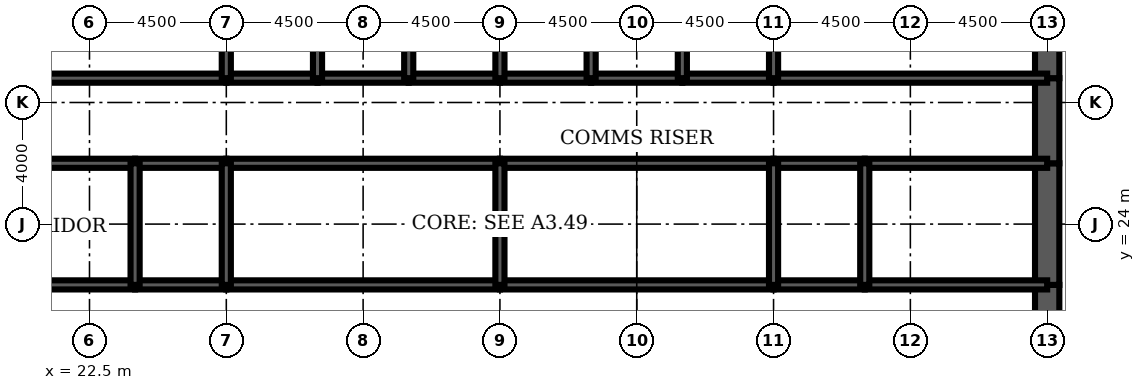
"""IFC4 building model, lengths in metres.
Left out: names, types, materials, properties, quantities, classifications, styles, units other than length and angle.
Written with IfcOpenShell. Run it as: python <this file> out.ifc"""

import sys

from ifc_helpers import new_model, si_unit, direction, frame, frame_2d, origin, place, context, subcontext, project, spatial, rectangle, extrude, element, fill, save


model = new_model("IFC4")
c1 = context("Model", 3, precision=1e-05, world=origin(), true_north=direction((0.0, 1.0)))
c2 = subcontext(c1, "Body", "Model", "MODEL_VIEW")
j1 = project(units=[si_unit("LENGTHUNIT", "METRE"), si_unit("PLANEANGLEUNIT", "RADIAN")], contexts=[c1])
p1 = place(None, origin())
s1 = spatial("IfcSite", under=j1, at=p1, CompositionType="ELEMENT")
p2 = place(p1, origin())
s2 = spatial("IfcBuilding", under=s1, at=p2, CompositionType="ELEMENT")
p3 = place(p2, frame((0.0, 0.0, 211.0)))
s3 = spatial("IfcBuildingStorey", under=s2, at=p3, CompositionType="ELEMENT", Elevation=211.0)
p4 = place(p3, frame((54.0, 19.2, 0.0), z_axis=(0.0, 0.0, 1.0), x_axis=(0.0, 1.0, 0.0)))
e1 = element("IfcWall", 1, at=p4, inside=s3, PredefinedType="SHEAR", context=c2, shape_type="SweptSolid", body=[
    extrude(rectangle(XDim=2.8, YDim=0.8, at=frame_2d((1.4, 0.0))), origin(), (0.0, 0.0, 1.0), 4.2),
])
p5 = place(p4, frame((0.4, 0.0, 0.0)))
e2 = element("IfcOpeningElement", 2, at=p5, cuts=e1, PredefinedType="OPENING", context=c2, shape_type="SweptSolid", body=[
    extrude(rectangle(XDim=1.8, YDim=2.1, at=frame_2d((0.9, 1.05))), frame((0.0, 0.41, 0.0), z_axis=(0.0, -1.0, 0.0), x_axis=(1.0, 0.0, 0.0)), (0.0, 0.0, 1.0), 0.82),
])
p6 = place(p3, frame((54.0, 22.0, 0.0), z_axis=(0.0, 0.0, 1.0), x_axis=(0.0, 1.0, 0.0)))
e3 = element("IfcWall", 3, at=p6, inside=s3, PredefinedType="SHEAR", context=c2, shape_type="SweptSolid", body=[
    extrude(rectangle(XDim=4.0, YDim=0.8, at=frame_2d((2.0, 0.0))), origin(), (0.0, 0.0, 1.0), 4.2),
])
p7 = place(p3, frame((54.0, 26.0, 0.0), z_axis=(0.0, 0.0, 1.0), x_axis=(0.0, 1.0, 0.0)))
e4 = element("IfcWall", 4, at=p7, inside=s3, PredefinedType="SHEAR", context=c2, shape_type="SweptSolid", body=[
    extrude(rectangle(XDim=2.8, YDim=0.8, at=frame_2d((1.4, 0.0))), origin(), (0.0, 0.0, 1.0), 4.2),
])
p8 = place(p7, frame((0.6, 0.0, 0.0)))
e5 = element("IfcOpeningElement", 5, at=p8, cuts=e4, PredefinedType="OPENING", context=c2, shape_type="SweptSolid", body=[
    extrude(rectangle(XDim=1.8, YDim=2.1, at=frame_2d((0.9, 1.05))), frame((0.0, 0.41, 0.0), z_axis=(0.0, -1.0, 0.0), x_axis=(1.0, 0.0, 0.0)), (0.0, 0.0, 1.0), 0.82),
])
p9 = place(p3, frame((54.0, 28.8, 0.0), z_axis=(0.0, 0.0, 1.0), x_axis=(0.0, 1.0, 0.0)))
e6 = element("IfcWall", 6, at=p9, inside=s3, PredefinedType="SHEAR", context=c2, shape_type="SweptSolid", body=[
    extrude(rectangle(XDim=3.2, YDim=0.8, at=frame_2d((1.6, 0.0))), origin(), (0.0, 0.0, 1.0), 4.2),
])
p10 = place(p3, frame((18.0, 28.8, 0.0), z_axis=(0.0, 0.0, 1.0), x_axis=(1.0, 0.0, 0.0)))
e7 = element("IfcWall", 7, at=p10, inside=s3, PredefinedType="SOLIDWALL", context=c2, shape_type="SweptSolid", body=[
    extrude(rectangle(XDim=9.0, YDim=0.3, at=frame_2d((4.5, 0.0))), origin(), (0.0, 0.0, 1.0), 4.2),
])
p11 = place(p10, frame((0.65, 0.0, 0.0)))
e8 = element("IfcOpeningElement", 8, at=p11, cuts=e7, PredefinedType="OPENING", context=c2, shape_type="SweptSolid", body=[
    extrude(rectangle(XDim=1.0, YDim=2.1, at=frame_2d((0.5, 1.05))), frame((0.0, 0.16, 0.0), z_axis=(0.0, -1.0, 0.0), x_axis=(1.0, 0.0, 0.0)), (0.0, 0.0, 1.0), 0.32),
])
p12 = place(p3, frame((27.0, 28.8, 0.0), z_axis=(0.0, 0.0, 1.0), x_axis=(1.0, 0.0, 0.0)))
e9 = element("IfcWall", 9, at=p12, inside=s3, PredefinedType="SOLIDWALL", context=c2, shape_type="SweptSolid", body=[
    extrude(rectangle(XDim=3.0, YDim=0.3, at=frame_2d((1.5, 0.0))), origin(), (0.0, 0.0, 1.0), 4.2),
])
p13 = place(p12, frame((0.95, 0.0, 0.0)))
e10 = element("IfcOpeningElement", 10, at=p13, cuts=e9, PredefinedType="OPENING", context=c2, shape_type="SweptSolid", body=[
    extrude(rectangle(XDim=1.1, YDim=2.2, at=frame_2d((0.55, 1.1))), frame((0.0, 0.16, 0.0), z_axis=(0.0, -1.0, 0.0), x_axis=(1.0, 0.0, 0.0)), (0.0, 0.0, 1.0), 0.32),
])
p14 = place(p3, frame((30.0, 28.8, 0.0), z_axis=(0.0, 0.0, 1.0), x_axis=(1.0, 0.0, 0.0)))
e11 = element("IfcWall", 11, at=p14, inside=s3, PredefinedType="SOLIDWALL", context=c2, shape_type="SweptSolid", body=[
    extrude(rectangle(XDim=3.0, YDim=0.3, at=frame_2d((1.5, 0.0))), origin(), (0.0, 0.0, 1.0), 4.2),
])
p15 = place(p14, frame((0.95, 0.0, 0.0)))
e12 = element("IfcOpeningElement", 12, at=p15, cuts=e11, PredefinedType="OPENING", context=c2, shape_type="SweptSolid", body=[
    extrude(rectangle(XDim=1.1, YDim=2.2, at=frame_2d((0.55, 1.1))), frame((0.0, 0.16, 0.0), z_axis=(0.0, -1.0, 0.0), x_axis=(1.0, 0.0, 0.0)), (0.0, 0.0, 1.0), 0.32),
])
p16 = place(p3, frame((33.0, 28.8, 0.0), z_axis=(0.0, 0.0, 1.0), x_axis=(1.0, 0.0, 0.0)))
e13 = element("IfcWall", 13, at=p16, inside=s3, PredefinedType="SOLIDWALL", context=c2, shape_type="SweptSolid", body=[
    extrude(rectangle(XDim=3.0, YDim=0.3, at=frame_2d((1.5, 0.0))), origin(), (0.0, 0.0, 1.0), 4.2),
])
p17 = place(p16, frame((0.95, 0.0, 0.0)))
e14 = element("IfcOpeningElement", 14, at=p17, cuts=e13, PredefinedType="OPENING", context=c2, shape_type="SweptSolid", body=[
    extrude(rectangle(XDim=1.1, YDim=2.2, at=frame_2d((0.55, 1.1))), frame((0.0, 0.16, 0.0), z_axis=(0.0, -1.0, 0.0), x_axis=(1.0, 0.0, 0.0)), (0.0, 0.0, 1.0), 0.32),
])
for number, where, z_axis, x_axis in (
    (15, (36.0, 28.8, 0.0), (0.0, 0.0, 1.0), (1.0, 0.0, 0.0)),
    (16, (39.0, 28.8, 0.0), (0.0, 0.0, 1.0), (1.0, 0.0, 0.0)),
):
    element("IfcWall", number, at=place(p3, frame(where, z_axis=z_axis, x_axis=x_axis)), inside=s3, PredefinedType="SOLIDWALL", context=c2, shape_type="SweptSolid", body=[
        extrude(rectangle(XDim=3.0, YDim=0.3, at=frame_2d((1.5, 0.0))), origin(), (0.0, 0.0, 1.0), 4.2),
    ])
p18 = place(p3, frame((42.0, 28.8, 0.0), z_axis=(0.0, 0.0, 1.0), x_axis=(1.0, 0.0, 0.0)))
e17 = element("IfcWall", 17, at=p18, inside=s3, PredefinedType="SOLIDWALL", context=c2, shape_type="SweptSolid", body=[
    extrude(rectangle(XDim=3.0, YDim=0.3, at=frame_2d((1.5, 0.0))), origin(), (0.0, 0.0, 1.0), 4.2),
])
p19 = place(p18, frame((0.95, 0.0, 0.0)))
e18 = element("IfcOpeningElement", 18, at=p19, cuts=e17, PredefinedType="OPENING", context=c2, shape_type="SweptSolid", body=[
    extrude(rectangle(XDim=1.1, YDim=2.2, at=frame_2d((0.55, 1.1))), frame((0.0, 0.16, 0.0), z_axis=(0.0, -1.0, 0.0), x_axis=(1.0, 0.0, 0.0)), (0.0, 0.0, 1.0), 0.32),
])
p20 = place(p3, frame((45.0, 28.8, 0.0), z_axis=(0.0, 0.0, 1.0), x_axis=(1.0, 0.0, 0.0)))
e19 = element("IfcWall", 19, at=p20, inside=s3, PredefinedType="SOLIDWALL", context=c2, shape_type="SweptSolid", body=[
    extrude(rectangle(XDim=9.0, YDim=0.3, at=frame_2d((4.5, 0.0))), origin(), (0.0, 0.0, 1.0), 4.2),
])
p21 = place(p20, frame((7.35, 0.0, 0.0)))
e20 = element("IfcOpeningElement", 20, at=p21, cuts=e19, PredefinedType="OPENING", context=c2, shape_type="SweptSolid", body=[
    extrude(rectangle(XDim=1.0, YDim=2.1, at=frame_2d((0.5, 1.05))), frame((0.0, 0.16, 0.0), z_axis=(0.0, -1.0, 0.0), x_axis=(1.0, 0.0, 0.0)), (0.0, 0.0, 1.0), 0.32),
])
p22 = place(p3, frame((18.0, 22.0, 0.0), z_axis=(0.0, 0.0, 1.0), x_axis=(1.0, 0.0, 0.0)))
e21 = element("IfcWall", 21, at=p22, inside=s3, PredefinedType="SOLIDWALL", context=c2, shape_type="SweptSolid", body=[
    extrude(rectangle(XDim=6.0, YDim=0.3, at=frame_2d((3.0, 0.0))), origin(), (0.0, 0.0, 1.0), 4.2),
])
p23 = place(p22, frame((2.0, 0.0, 0.0)))
e22 = element("IfcOpeningElement", 22, at=p23, cuts=e21, PredefinedType="OPENING", context=c2, shape_type="SweptSolid", body=[
    extrude(rectangle(XDim=1.0, YDim=2.1, at=frame_2d((0.5, 1.05))), frame((0.0, 0.16, 0.0), z_axis=(0.0, -1.0, 0.0), x_axis=(1.0, 0.0, 0.0)), (0.0, 0.0, 1.0), 0.32),
])
p24 = place(p3, frame((24.0, 22.0, 0.0), z_axis=(0.0, 0.0, 1.0), x_axis=(1.0, 0.0, 0.0)))
e23 = element("IfcWall", 23, at=p24, inside=s3, PredefinedType="SOLIDWALL", context=c2, shape_type="SweptSolid", body=[
    extrude(rectangle(XDim=3.0, YDim=0.3, at=frame_2d((1.5, 0.0))), origin(), (0.0, 0.0, 1.0), 4.2),
])
p25 = place(p24, frame((1.0, 0.0, 0.0)))
e24 = element("IfcOpeningElement", 24, at=p25, cuts=e23, PredefinedType="OPENING", context=c2, shape_type="SweptSolid", body=[
    extrude(rectangle(XDim=1.0, YDim=2.1, at=frame_2d((0.5, 1.05))), frame((0.0, 0.16, 0.0), z_axis=(0.0, -1.0, 0.0), x_axis=(1.0, 0.0, 0.0)), (0.0, 0.0, 1.0), 0.32),
])
p26 = place(p3, frame((27.0, 22.0, 0.0), z_axis=(0.0, 0.0, 1.0), x_axis=(1.0, 0.0, 0.0)))
e25 = element("IfcWall", 25, at=p26, inside=s3, PredefinedType="SOLIDWALL", context=c2, shape_type="SweptSolid", body=[
    extrude(rectangle(XDim=9.0, YDim=0.3, at=frame_2d((4.5, 0.0))), origin(), (0.0, 0.0, 1.0), 4.2),
])
p27 = place(p26, frame((4.0, 0.0, 0.0)))
e26 = element("IfcOpeningElement", 26, at=p27, cuts=e25, PredefinedType="OPENING", context=c2, shape_type="SweptSolid", body=[
    extrude(rectangle(XDim=1.0, YDim=2.1, at=frame_2d((0.5, 1.05))), frame((0.0, 0.16, 0.0), z_axis=(0.0, -1.0, 0.0), x_axis=(1.0, 0.0, 0.0)), (0.0, 0.0, 1.0), 0.32),
])
p28 = place(p3, frame((36.0, 22.0, 0.0), z_axis=(0.0, 0.0, 1.0), x_axis=(1.0, 0.0, 0.0)))
e27 = element("IfcWall", 27, at=p28, inside=s3, PredefinedType="SOLIDWALL", context=c2, shape_type="SweptSolid", body=[
    extrude(rectangle(XDim=9.0, YDim=0.3, at=frame_2d((4.5, 0.0))), origin(), (0.0, 0.0, 1.0), 4.2),
])
p29 = place(p28, frame((4.0, 0.0, 0.0)))
e28 = element("IfcOpeningElement", 28, at=p29, cuts=e27, PredefinedType="OPENING", context=c2, shape_type="SweptSolid", body=[
    extrude(rectangle(XDim=1.0, YDim=2.1, at=frame_2d((0.5, 1.05))), frame((0.0, 0.16, 0.0), z_axis=(0.0, -1.0, 0.0), x_axis=(1.0, 0.0, 0.0)), (0.0, 0.0, 1.0), 0.32),
])
p30 = place(p3, frame((45.0, 22.0, 0.0), z_axis=(0.0, 0.0, 1.0), x_axis=(1.0, 0.0, 0.0)))
e29 = element("IfcWall", 29, at=p30, inside=s3, PredefinedType="SOLIDWALL", context=c2, shape_type="SweptSolid", body=[
    extrude(rectangle(XDim=3.0, YDim=0.3, at=frame_2d((1.5, 0.0))), origin(), (0.0, 0.0, 1.0), 4.2),
])
p31 = place(p30, frame((1.0, 0.0, 0.0)))
e30 = element("IfcOpeningElement", 30, at=p31, cuts=e29, PredefinedType="OPENING", context=c2, shape_type="SweptSolid", body=[
    extrude(rectangle(XDim=1.0, YDim=2.1, at=frame_2d((0.5, 1.05))), frame((0.0, 0.16, 0.0), z_axis=(0.0, -1.0, 0.0), x_axis=(1.0, 0.0, 0.0)), (0.0, 0.0, 1.0), 0.32),
])
p32 = place(p3, frame((48.0, 22.0, 0.0), z_axis=(0.0, 0.0, 1.0), x_axis=(1.0, 0.0, 0.0)))
e31 = element("IfcWall", 31, at=p32, inside=s3, PredefinedType="SOLIDWALL", context=c2, shape_type="SweptSolid", body=[
    extrude(rectangle(XDim=6.0, YDim=0.3, at=frame_2d((3.0, 0.0))), origin(), (0.0, 0.0, 1.0), 4.2),
])
p33 = place(p32, frame((2.0, 0.0, 0.0)))
e32 = element("IfcOpeningElement", 32, at=p33, cuts=e31, PredefinedType="OPENING", context=c2, shape_type="SweptSolid", body=[
    extrude(rectangle(XDim=1.0, YDim=2.1, at=frame_2d((0.5, 1.05))), frame((0.0, 0.16, 0.0), z_axis=(0.0, -1.0, 0.0), x_axis=(1.0, 0.0, 0.0)), (0.0, 0.0, 1.0), 0.32),
])
p34 = place(p32, frame((4.2, 0.0, 0.0)))
e33 = element("IfcOpeningElement", 33, at=p34, cuts=e31, PredefinedType="OPENING", context=c2, shape_type="SweptSolid", body=[
    extrude(rectangle(XDim=1.0, YDim=2.1, at=frame_2d((0.5, 1.05))), frame((0.0, 0.16, 0.0), z_axis=(0.0, -1.0, 0.0), x_axis=(1.0, 0.0, 0.0)), (0.0, 0.0, 1.0), 0.32),
])
p35 = place(p3, frame((18.0, 26.0, 0.0), z_axis=(0.0, 0.0, 1.0), x_axis=(1.0, 0.0, 0.0)))
e34 = element("IfcWall", 34, at=p35, inside=s3, PredefinedType="SOLIDWALL", context=c2, shape_type="SweptSolid", body=[
    extrude(rectangle(XDim=6.0, YDim=0.3, at=frame_2d((3.0, 0.0))), origin(), (0.0, 0.0, 1.0), 4.2),
])
p36 = place(p3, frame((24.0, 26.0, 0.0), z_axis=(0.0, 0.0, 1.0), x_axis=(1.0, 0.0, 0.0)))
e35 = element("IfcWall", 35, at=p36, inside=s3, PredefinedType="SOLIDWALL", context=c2, shape_type="SweptSolid", body=[
    extrude(rectangle(XDim=3.0, YDim=0.3, at=frame_2d((1.5, 0.0))), origin(), (0.0, 0.0, 1.0), 4.2),
])
for number, where, z_axis, x_axis in (
    (36, (27.0, 26.0, 0.0), (0.0, 0.0, 1.0), (1.0, 0.0, 0.0)),
    (37, (36.0, 26.0, 0.0), (0.0, 0.0, 1.0), (1.0, 0.0, 0.0)),
):
    element("IfcWall", number, at=place(p3, frame(where, z_axis=z_axis, x_axis=x_axis)), inside=s3, PredefinedType="SOLIDWALL", context=c2, shape_type="SweptSolid", body=[
        extrude(rectangle(XDim=9.0, YDim=0.3, at=frame_2d((4.5, 0.0))), origin(), (0.0, 0.0, 1.0), 4.2),
    ])
p37 = place(p3, frame((45.0, 26.0, 0.0), z_axis=(0.0, 0.0, 1.0), x_axis=(1.0, 0.0, 0.0)))
e38 = element("IfcWall", 38, at=p37, inside=s3, PredefinedType="SOLIDWALL", context=c2, shape_type="SweptSolid", body=[
    extrude(rectangle(XDim=3.0, YDim=0.3, at=frame_2d((1.5, 0.0))), origin(), (0.0, 0.0, 1.0), 4.2),
])
p38 = place(p3, frame((48.0, 26.0, 0.0), z_axis=(0.0, 0.0, 1.0), x_axis=(1.0, 0.0, 0.0)))
e39 = element("IfcWall", 39, at=p38, inside=s3, PredefinedType="SOLIDWALL", context=c2, shape_type="SweptSolid", body=[
    extrude(rectangle(XDim=6.0, YDim=0.3, at=frame_2d((3.0, 0.0))), origin(), (0.0, 0.0, 1.0), 4.2),
])
for number, where, z_axis, x_axis in (
    (40, (27.0, 28.8, 0.0), (0.0, 0.0, 1.0), (0.0, 1.0, 0.0)),
    (41, (30.0, 28.8, 0.0), (0.0, 0.0, 1.0), (0.0, 1.0, 0.0)),
    (42, (33.0, 28.8, 0.0), (0.0, 0.0, 1.0), (0.0, 1.0, 0.0)),
    (43, (36.0, 28.8, 0.0), (0.0, 0.0, 1.0), (0.0, 1.0, 0.0)),
    (44, (39.0, 28.8, 0.0), (0.0, 0.0, 1.0), (0.0, 1.0, 0.0)),
    (45, (42.0, 28.8, 0.0), (0.0, 0.0, 1.0), (0.0, 1.0, 0.0)),
    (46, (45.0, 28.8, 0.0), (0.0, 0.0, 1.0), (0.0, 1.0, 0.0)),
):
    element("IfcWall", number, at=place(p3, frame(where, z_axis=z_axis, x_axis=x_axis)), inside=s3, PredefinedType="SOLIDWALL", context=c2, shape_type="SweptSolid", body=[
        extrude(rectangle(XDim=3.2, YDim=0.3, at=frame_2d((1.6, 0.0))), origin(), (0.0, 0.0, 1.0), 4.2),
    ])
for number, where, z_axis, x_axis in (
    (47, (24.0, 22.0, 0.0), (0.0, 0.0, 1.0), (0.0, 1.0, 0.0)),
    (48, (27.0, 22.0, 0.0), (0.0, 0.0, 1.0), (0.0, 1.0, 0.0)),
    (49, (36.0, 22.0, 0.0), (0.0, 0.0, 1.0), (0.0, 1.0, 0.0)),
    (50, (45.0, 22.0, 0.0), (0.0, 0.0, 1.0), (0.0, 1.0, 0.0)),
    (51, (48.0, 22.0, 0.0), (0.0, 0.0, 1.0), (0.0, 1.0, 0.0)),
):
    element("IfcWall", number, at=place(p3, frame(where, z_axis=z_axis, x_axis=x_axis)), inside=s3, PredefinedType="SOLIDWALL", context=c2, shape_type="SweptSolid", body=[
        extrude(rectangle(XDim=4.0, YDim=0.3, at=frame_2d((2.0, 0.0))), origin(), (0.0, 0.0, 1.0), 4.2),
    ])
p39 = place(p3, frame((51.725, 22.15, 0.0), z_axis=(0.0, 0.0, 1.0), x_axis=(0.0, 1.0, 0.0)))
e52 = element("IfcWall", 52, at=p39, inside=s3, PredefinedType="PARTITIONING", context=c2, shape_type="SweptSolid", body=[
    extrude(rectangle(XDim=3.7, YDim=0.15, at=frame_2d((1.85, 0.0))), origin(), (0.0, 0.0, 1.0), 3.0),
])
p40 = place(p3, frame((22.2, 26.15, 0.0), z_axis=(0.0, 0.0, 1.0), x_axis=(0.0, 1.0, 0.0)))
e53 = element("IfcWall", 53, at=p40, inside=s3, PredefinedType="PARTITIONING", context=c2, shape_type="SweptSolid", body=[
    extrude(rectangle(XDim=2.5, YDim=0.15, at=frame_2d((1.25, 0.0))), origin(), (0.0, 0.0, 1.0), 3.0),
])
p41 = place(p40, frame((0.35, 0.0, 0.0)))
e54 = element("IfcOpeningElement", 54, at=p41, cuts=e53, PredefinedType="OPENING", context=c2, shape_type="SweptSolid", body=[
    extrude(rectangle(XDim=1.0, YDim=2.1, at=frame_2d((0.5, 1.05))), frame((0.0, 0.085, 0.0), z_axis=(0.0, -1.0, 0.0), x_axis=(1.0, 0.0, 0.0)), (0.0, 0.0, 1.0), 0.17),
])
p42 = place(p41, origin())
e55 = element("IfcDoor", 55, at=p42, inside=s3, OperationType="SINGLE_SWING_LEFT", PredefinedType="DOOR", context=c2, shape_type="SweptSolid", body=[
    extrude(rectangle(XDim=1.0, YDim=2.1, at=frame_2d((0.5, 1.05))), frame((0.0, 0.025, 0.0), z_axis=(0.0, -1.0, 0.0), x_axis=(1.0, 0.0, 0.0)), (0.0, 0.0, 1.0), 0.05),
])
fill(e54, e55)
p43 = place(p19, origin())
e56 = element("IfcDoor", 56, at=p43, inside=s3, OperationType="DOUBLE_DOOR_SLIDING", PredefinedType="USERDEFINED", context=c2, shape_type="SweptSolid", body=[
    extrude(rectangle(XDim=1.1, YDim=2.2, at=frame_2d((0.55, 1.1))), frame((0.0, 0.025, 0.0), z_axis=(0.0, -1.0, 0.0), x_axis=(1.0, 0.0, 0.0)), (0.0, 0.0, 1.0), 0.05),
])
fill(e18, e56)
p44 = place(p13, origin())
e57 = element("IfcDoor", 57, at=p44, inside=s3, OperationType="DOUBLE_DOOR_SLIDING", PredefinedType="USERDEFINED", context=c2, shape_type="SweptSolid", body=[
    extrude(rectangle(XDim=1.1, YDim=2.2, at=frame_2d((0.55, 1.1))), frame((0.0, 0.025, 0.0), z_axis=(0.0, -1.0, 0.0), x_axis=(1.0, 0.0, 0.0)), (0.0, 0.0, 1.0), 0.05),
])
fill(e10, e57)
p45 = place(p15, origin())
e58 = element("IfcDoor", 58, at=p45, inside=s3, OperationType="DOUBLE_DOOR_SLIDING", PredefinedType="USERDEFINED", context=c2, shape_type="SweptSolid", body=[
    extrude(rectangle(XDim=1.1, YDim=2.2, at=frame_2d((0.55, 1.1))), frame((0.0, 0.025, 0.0), z_axis=(0.0, -1.0, 0.0), x_axis=(1.0, 0.0, 0.0)), (0.0, 0.0, 1.0), 0.05),
])
fill(e12, e58)
p46 = place(p17, origin())
e59 = element("IfcDoor", 59, at=p46, inside=s3, OperationType="DOUBLE_DOOR_SLIDING", PredefinedType="USERDEFINED", context=c2, shape_type="SweptSolid", body=[
    extrude(rectangle(XDim=1.1, YDim=2.2, at=frame_2d((0.55, 1.1))), frame((0.0, 0.025, 0.0), z_axis=(0.0, -1.0, 0.0), x_axis=(1.0, 0.0, 0.0)), (0.0, 0.0, 1.0), 0.05),
])
fill(e14, e59)
p47 = place(p21, origin())
e60 = element("IfcDoor", 60, at=p47, inside=s3, OperationType="SINGLE_SWING_RIGHT", PredefinedType="DOOR", context=c2, shape_type="SweptSolid", body=[
    extrude(rectangle(XDim=1.0, YDim=2.1, at=frame_2d((0.5, 1.05))), frame((0.0, 0.025, 0.0), z_axis=(0.0, -1.0, 0.0), x_axis=(1.0, 0.0, 0.0)), (0.0, 0.0, 1.0), 0.05),
])
fill(e20, e60)
p48 = place(p5, origin())
e61 = element("IfcDoor", 61, at=p48, inside=s3, OperationType="SINGLE_SWING_LEFT", PredefinedType="DOOR", context=c2, shape_type="SweptSolid", body=[
    extrude(rectangle(XDim=1.8, YDim=2.1, at=frame_2d((0.9, 1.05))), frame((0.0, 0.4, 0.0), z_axis=(0.0, -1.0, 0.0), x_axis=(1.0, 0.0, 0.0)), (0.0, 0.0, 1.0), 0.8),
])
fill(e2, e61)
p49 = place(p8, origin())
e62 = element("IfcDoor", 62, at=p49, inside=s3, OperationType="SINGLE_SWING_LEFT", PredefinedType="DOOR", context=c2, shape_type="SweptSolid", body=[
    extrude(rectangle(XDim=1.8, YDim=2.1, at=frame_2d((0.9, 1.05))), frame((0.0, 0.4, 0.0), z_axis=(0.0, -1.0, 0.0), x_axis=(1.0, 0.0, 0.0)), (0.0, 0.0, 1.0), 0.8),
])
fill(e5, e62)
p50 = place(p25, origin())
e63 = element("IfcDoor", 63, at=p50, inside=s3, OperationType="SINGLE_SWING_LEFT", PredefinedType="DOOR", context=c2, shape_type="SweptSolid", body=[
    extrude(rectangle(XDim=1.0, YDim=2.1, at=frame_2d((0.5, 1.05))), frame((0.0, 0.025, 0.0), z_axis=(0.0, -1.0, 0.0), x_axis=(1.0, 0.0, 0.0)), (0.0, 0.0, 1.0), 0.05),
])
fill(e24, e63)
p51 = place(p27, origin())
e64 = element("IfcDoor", 64, at=p51, inside=s3, OperationType="SINGLE_SWING_LEFT", PredefinedType="DOOR", context=c2, shape_type="SweptSolid", body=[
    extrude(rectangle(XDim=1.0, YDim=2.1, at=frame_2d((0.5, 1.05))), frame((0.0, 0.025, 0.0), z_axis=(0.0, -1.0, 0.0), x_axis=(1.0, 0.0, 0.0)), (0.0, 0.0, 1.0), 0.05),
])
fill(e26, e64)
p52 = place(p29, origin())
e65 = element("IfcDoor", 65, at=p52, inside=s3, OperationType="SINGLE_SWING_LEFT", PredefinedType="DOOR", context=c2, shape_type="SweptSolid", body=[
    extrude(rectangle(XDim=1.0, YDim=2.1, at=frame_2d((0.5, 1.05))), frame((0.0, 0.025, 0.0), z_axis=(0.0, -1.0, 0.0), x_axis=(1.0, 0.0, 0.0)), (0.0, 0.0, 1.0), 0.05),
])
fill(e28, e65)
p53 = place(p31, origin())
e66 = element("IfcDoor", 66, at=p53, inside=s3, OperationType="SINGLE_SWING_LEFT", PredefinedType="DOOR", context=c2, shape_type="SweptSolid", body=[
    extrude(rectangle(XDim=1.0, YDim=2.1, at=frame_2d((0.5, 1.05))), frame((0.0, 0.025, 0.0), z_axis=(0.0, -1.0, 0.0), x_axis=(1.0, 0.0, 0.0)), (0.0, 0.0, 1.0), 0.05),
])
fill(e30, e66)
p54 = place(p33, origin())
e67 = element("IfcDoor", 67, at=p54, inside=s3, OperationType="SINGLE_SWING_LEFT", PredefinedType="DOOR", context=c2, shape_type="SweptSolid", body=[
    extrude(rectangle(XDim=1.0, YDim=2.1, at=frame_2d((0.5, 1.05))), frame((0.0, 0.025, 0.0), z_axis=(0.0, -1.0, 0.0), x_axis=(1.0, 0.0, 0.0)), (0.0, 0.0, 1.0), 0.05),
])
fill(e32, e67)
p55 = place(p34, origin())
e68 = element("IfcDoor", 68, at=p55, inside=s3, OperationType="SINGLE_SWING_RIGHT", PredefinedType="DOOR", context=c2, shape_type="SweptSolid", body=[
    extrude(rectangle(XDim=1.0, YDim=2.1, at=frame_2d((0.5, 1.05))), frame((0.0, 0.025, 0.0), z_axis=(0.0, -1.0, 0.0), x_axis=(1.0, 0.0, 0.0)), (0.0, 0.0, 1.0), 0.05),
])
fill(e33, e68)
save(model, sys.argv[1])
